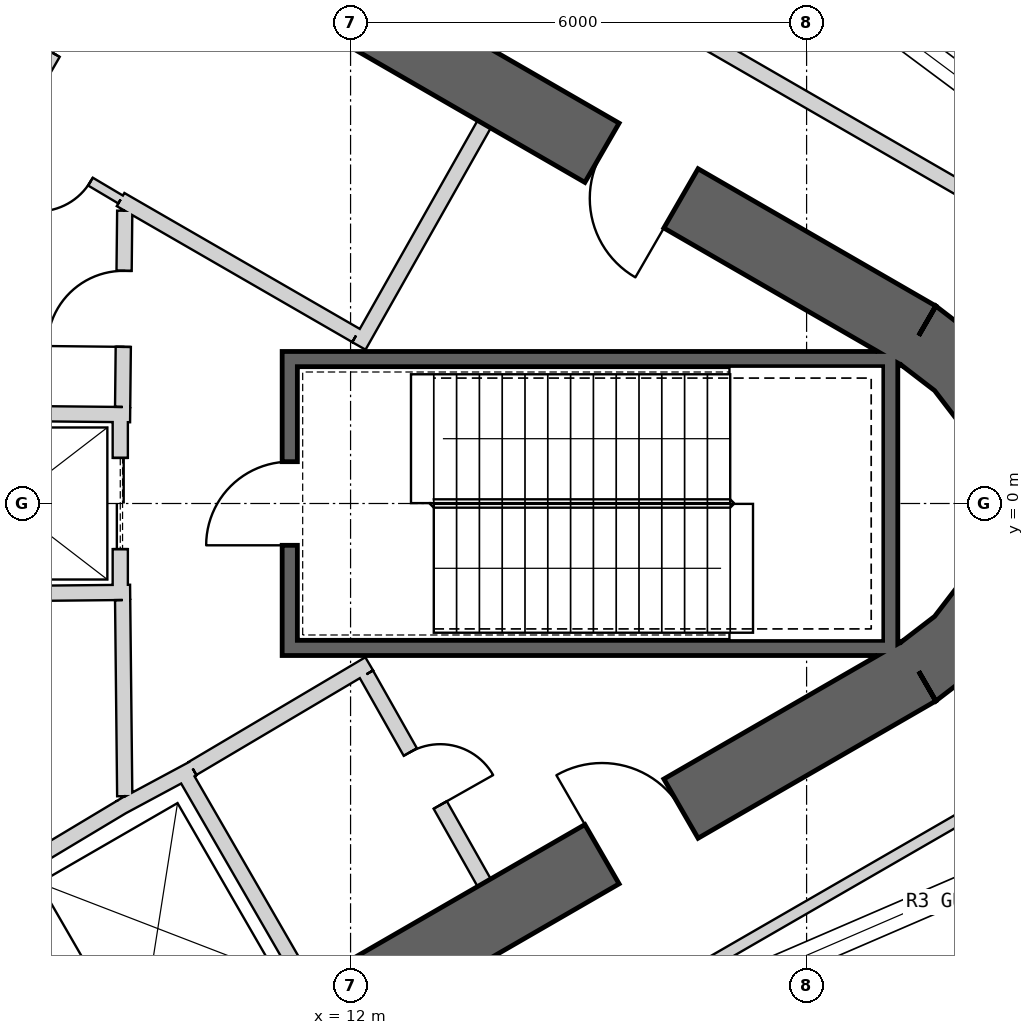
"""IFC4 building model, lengths in metres.
Left out: names, types, materials, properties, quantities, classifications, styles, units other than length and angle.
Written with IfcOpenShell. Run it as: python <this file> out.ifc"""

import sys

from ifc_helpers import new_model, si_unit, direction, frame, frame_2d, origin, place, context, subcontext, project, spatial, polyline, rectangle, outline, extrude, element, fill, save


model = new_model("IFC4")
c1 = context("Model", 3, precision=1e-05, world=origin(), true_north=direction((0.0, 1.0)))
c2 = subcontext(c1, "Body", "Model", "MODEL_VIEW")
j1 = project(units=[si_unit("LENGTHUNIT", "METRE"), si_unit("PLANEANGLEUNIT", "RADIAN")], contexts=[c1])
p1 = place(None, origin())
s1 = spatial("IfcSite", under=j1, at=p1, CompositionType="ELEMENT")
p2 = place(p1, origin())
s2 = spatial("IfcBuilding", under=s1, at=p2, CompositionType="ELEMENT")
p3 = place(p2, frame((0.0, 0.0, 430.3)))
s3 = spatial("IfcBuildingStorey", under=s2, at=p3, CompositionType="ELEMENT", Elevation=430.3)
p4 = place(p3, frame((19.475, 2.208, 0.0), z_axis=(0.0, 0.0, 1.0), x_axis=(-0.866028369851, 0.499994862586, 0.0)))
e1 = element("IfcWall", 1, at=p4, inside=s3, PredefinedType="SHEAR", context=c2, shape_type="SweptSolid", body=[
    extrude(rectangle(XDim=31.523, YDim=0.9, at=frame_2d((15.762, 0.0))), origin(), (0.0, 0.0, 1.0), 5.0),
])
p5 = place(p4, frame((3.612, 0.0, 0.0)))
e2 = element("IfcOpeningElement", 2, at=p5, cuts=e1, PredefinedType="OPENING", context=c2, shape_type="SweptSolid", body=[
    extrude(rectangle(XDim=1.2, YDim=2.4, at=frame_2d((0.6, 1.2))), frame((0.0, 0.46, 0.0), z_axis=(0.0, -1.0, 0.0), x_axis=(1.0, 0.0, 0.0)), (0.0, 0.0, 1.0), 0.92),
])
p6 = place(p4, frame((26.712, 0.0, 0.0)))
e3 = element("IfcOpeningElement", 3, at=p6, cuts=e1, PredefinedType="OPENING", context=c2, shape_type="SweptSolid", body=[
    extrude(rectangle(XDim=1.2, YDim=2.4, at=frame_2d((0.6, 1.2))), frame((0.0, 0.46, 0.0), z_axis=(0.0, -1.0, 0.0), x_axis=(1.0, 0.0, 0.0)), (0.0, 0.0, 1.0), 0.92),
])
p7 = place(p3, frame((-7.825, -17.97, 0.0), z_axis=(0.0, 0.0, 1.0), x_axis=(0.866028369851, 0.499994862586, 0.0)))
e4 = element("IfcWall", 4, at=p7, inside=s3, PredefinedType="SHEAR", context=c2, shape_type="SweptSolid", body=[
    extrude(rectangle(XDim=31.523, YDim=0.9, at=frame_2d((15.762, 0.0))), origin(), (0.0, 0.0, 1.0), 5.0),
])
p8 = place(p7, frame((17.862, 0.0, 0.0)))
e5 = element("IfcOpeningElement", 5, at=p8, cuts=e4, PredefinedType="OPENING", context=c2, shape_type="SweptSolid", body=[
    extrude(rectangle(XDim=1.2, YDim=2.4, at=frame_2d((0.6, 1.2))), frame((0.0, 0.46, 0.0), z_axis=(0.0, -1.0, 0.0), x_axis=(1.0, 0.0, 0.0)), (0.0, 0.0, 1.0), 0.92),
])
p9 = place(p7, frame((20.562, 0.0, 0.0)))
e6 = element("IfcOpeningElement", 6, at=p9, cuts=e4, PredefinedType="OPENING", context=c2, shape_type="SweptSolid", body=[
    extrude(rectangle(XDim=1.2, YDim=2.4, at=frame_2d((0.6, 1.2))), frame((0.0, 0.46, 0.0), z_axis=(0.0, -1.0, 0.0), x_axis=(1.0, 0.0, 0.0)), (0.0, 0.0, 1.0), 0.92),
])
p10 = place(p7, frame((26.712, 0.0, 0.0)))
e7 = element("IfcOpeningElement", 7, at=p10, cuts=e4, PredefinedType="OPENING", context=c2, shape_type="SweptSolid", body=[
    extrude(rectangle(XDim=1.2, YDim=2.4, at=frame_2d((0.6, 1.2))), frame((0.0, 0.46, 0.0), z_axis=(0.0, -1.0, 0.0), x_axis=(1.0, 0.0, 0.0)), (0.0, 0.0, 1.0), 0.92),
])
p11 = place(p7, frame((3.612, 0.0, 0.0)))
e8 = element("IfcOpeningElement", 8, at=p11, cuts=e4, PredefinedType="OPENING", context=c2, shape_type="SweptSolid", body=[
    extrude(rectangle(XDim=1.2, YDim=2.4, at=frame_2d((0.6, 1.2))), frame((0.0, 0.46, 0.0), z_axis=(0.0, -1.0, 0.0), x_axis=(1.0, 0.0, 0.0)), (0.0, 0.0, 1.0), 0.92),
])
p12 = place(p3, origin())
e9 = element("IfcWall", 9, at=p12, inside=s3, PredefinedType="SHEAR", context=c2, shape_type="SweptSolid", body=[
    extrude(outline(polyline([(19.7, -2.598), (20.321, -2.121), (20.798, -1.5), (21.098, -0.777), (21.2, 0.0), (21.098, 0.777), (20.798, 1.5), (20.321, 2.121), (19.7, 2.598), (19.25, 1.819), (19.685, 1.485), (20.019, 1.05), (20.229, 0.543), (20.3, 0.0), (20.229, -0.543), (20.019, -1.05), (19.685, -1.485), (19.25, -1.819), (19.7, -2.598)])), origin(), (0.0, 0.0, 1.0), 5.0),
])
p13 = place(p3, frame((9.795, -3.525, 0.0), z_axis=(0.0, 0.0, 1.0), x_axis=(0.499984717929, -0.866034226713, 0.0)))
e10 = element("IfcWall", 10, at=p13, inside=s3, PredefinedType="PLUMBINGWALL", context=c2, shape_type="SweptSolid", body=[
    extrude(rectangle(XDim=3.25, YDim=0.2, at=frame_2d((1.625, 0.0))), origin(), (0.0, 0.0, 1.0), 4.75),
])
p14 = place(p3, frame((8.974, -3.999, 0.0), z_axis=(0.0, 0.0, 1.0), x_axis=(0.880907015104, 0.473289373154, 0.0)))
e11 = element("IfcWall", 11, at=p14, inside=s3, PredefinedType="PLUMBINGWALL", context=c2, shape_type="SweptSolid", body=[
    extrude(rectangle(XDim=1.078, YDim=0.2, at=frame_2d((0.539, 0.0))), origin(), (0.0, 0.0, 1.0), 4.75),
])
p15 = place(p3, frame((7.497, -4.886, 0.0), z_axis=(0.0, 0.0, 1.0), x_axis=(0.857516281273, 0.51445682749, 0.0)))
e12 = element("IfcWall", 12, at=p15, inside=s3, PredefinedType="PLUMBINGWALL", context=c2, shape_type="SweptSolid", body=[
    extrude(rectangle(XDim=1.845, YDim=0.2, at=frame_2d((0.922, 0.0))), origin(), (0.0, 0.0, 1.0), 4.75),
])
p16 = place(p3, frame((19.2, 1.9, -0.25), z_axis=(0.0, 0.0, 1.0), x_axis=(-1.0, 0.0, 0.0)))
e13 = element("IfcWall", 13, at=p16, inside=s3, PredefinedType="SHEAR", context=c2, shape_type="SweptSolid", body=[
    extrude(rectangle(XDim=8.1, YDim=0.2, at=frame_2d((4.05, 0.0))), origin(), (0.0, 0.0, 1.0), 5.0),
])
p17 = place(p3, frame((19.1, -2.0, -0.25), z_axis=(0.0, 0.0, 1.0), x_axis=(0.0, 1.0, 0.0)))
e14 = element("IfcWall", 14, at=p17, inside=s3, PredefinedType="SHEAR", context=c2, shape_type="SweptSolid", body=[
    extrude(rectangle(XDim=3.8, YDim=0.2, at=frame_2d((1.9, 0.0))), origin(), (0.0, 0.0, 1.0), 5.0),
])
p18 = place(p3, frame((11.1, -1.9, -0.25), z_axis=(0.0, 0.0, 1.0), x_axis=(1.0, 0.0, 0.0)))
e15 = element("IfcWall", 15, at=p18, inside=s3, PredefinedType="SHEAR", context=c2, shape_type="SweptSolid", body=[
    extrude(rectangle(XDim=7.9, YDim=0.2, at=frame_2d((3.95, 0.0))), origin(), (0.0, 0.0, 1.0), 5.0),
])
p19 = place(p3, frame((11.2, -1.8, -0.25), z_axis=(0.0, 0.0, 1.0), x_axis=(0.0, 1.0, 0.0)))
e16 = element("IfcWall", 16, at=p19, inside=s3, PredefinedType="SHEAR", context=c2, shape_type="SweptSolid", body=[
    extrude(rectangle(XDim=3.6, YDim=0.2, at=frame_2d((1.8, 0.0))), origin(), (0.0, 0.0, 1.0), 5.0),
])
p20 = place(p19, frame((1.25, 0.0, 0.25)))
e17 = element("IfcOpeningElement", 17, at=p20, cuts=e16, PredefinedType="OPENING", context=c2, shape_type="SweptSolid", body=[
    extrude(rectangle(XDim=1.1, YDim=2.1, at=frame_2d((0.55, 1.05))), frame((0.0, 0.11, 0.0), z_axis=(0.0, -1.0, 0.0), x_axis=(1.0, 0.0, 0.0)), (0.0, 0.0, 1.0), 0.22),
])
p21 = place(p3, frame((8.97, 1.2, 0.0), z_axis=(0.0, 0.0, 1.0), x_axis=(0.0, -1.0, 0.0)))
e18 = element("IfcWall", 18, at=p21, inside=s3, PredefinedType="PLUMBINGWALL", context=c2, shape_type="SweptSolid", body=[
    extrude(rectangle(XDim=2.4, YDim=0.2, at=frame_2d((1.2, 0.0))), origin(), (0.0, 0.0, 1.0), 4.75),
])
p22 = place(p21, frame((0.6, 0.0, 0.0)))
e19 = element("IfcOpeningElement", 19, at=p22, cuts=e18, PredefinedType="OPENING", context=c2, shape_type="SweptSolid", body=[
    extrude(rectangle(XDim=1.2, YDim=2.4, at=frame_2d((0.6, 1.2))), frame((0.0, 0.11, 0.0), z_axis=(0.0, -1.0, 0.0), x_axis=(1.0, 0.0, 0.0)), (0.0, 0.0, 1.0), 0.22),
])
p23 = place(p3, frame((9.1, -1.169, 0.0), z_axis=(0.0, 0.0, 1.0), x_axis=(-0.999950064753, -0.009993397809, 0.0)))
e20 = element("IfcWall", 20, at=p23, inside=s3, PredefinedType="PLUMBINGWALL", context=c2, shape_type="SweptSolid", body=[
    extrude(rectangle(XDim=3.2, YDim=0.2, at=frame_2d((1.6, 0.0))), origin(), (0.0, 0.0, 1.0), 4.75),
])
p24 = place(p3, frame((9.1, 1.169, 0.0), z_axis=(0.0, 0.0, 1.0), x_axis=(-0.99994990606, 0.010009264196, 0.0)))
e21 = element("IfcWall", 21, at=p24, inside=s3, PredefinedType="PLUMBINGWALL", context=c2, shape_type="SweptSolid", body=[
    extrude(rectangle(XDim=3.0, YDim=0.2, at=frame_2d((1.5, 0.0))), origin(), (0.0, 0.0, 1.0), 4.75),
])
p25 = place(p3, frame((7.508, 4.845, 0.0), z_axis=(0.0, 0.0, 1.0), x_axis=(0.500017246033, 0.866015446554, 0.0)))
e22 = element("IfcWall", 22, at=p25, inside=s3, PredefinedType="PARTITIONING", context=c2, shape_type="SweptSolid", body=[
    extrude(rectangle(XDim=3.25, YDim=0.12, at=frame_2d((1.625, 0.0))), origin(), (0.0, 0.0, 1.0), 4.75),
])
p26 = place(p25, frame((1.225, 0.0, 0.0)))
e23 = element("IfcOpeningElement", 23, at=p26, cuts=e22, PredefinedType="OPENING", context=c2, shape_type="SweptSolid", body=[
    extrude(rectangle(XDim=0.8, YDim=2.1, at=frame_2d((0.4, 1.05))), frame((0.0, 0.07, 0.0), z_axis=(0.0, -1.0, 0.0), x_axis=(1.0, 0.0, 0.0)), (0.0, 0.0, 1.0), 0.14),
])
p27 = place(p3, frame((12.11, 2.073, 0.0), z_axis=(0.0, 0.0, 1.0), x_axis=(0.49196600604, 0.870614408852, 0.0)))
e24 = element("IfcWall", 24, at=p27, inside=s3, PredefinedType="PARTITIONING", context=c2, shape_type="SweptSolid", body=[
    extrude(rectangle(XDim=3.35, YDim=0.2, at=frame_2d((1.675, 0.0))), origin(), (0.0, 0.0, 1.0), 4.75),
])
p28 = place(p3, frame((8.974, 3.999, 0.0), z_axis=(0.0, 0.0, 1.0), x_axis=(0.86601284211, -0.500021756827, 0.0)))
e25 = element("IfcWall", 25, at=p28, inside=s3, PredefinedType="PARTITIONING", context=c2, shape_type="SweptSolid", body=[
    extrude(rectangle(XDim=3.577, YDim=0.2, at=frame_2d((1.789, 0.0))), origin(), (0.0, 0.0, 1.0), 4.75),
])
p29 = place(p3, frame((7.493, 4.878, 0.0), z_axis=(0.0, 0.0, 1.0), x_axis=(0.859934455514, -0.510404479035, 0.0)))
e26 = element("IfcWall", 26, at=p29, inside=s3, PredefinedType="PARTITIONING", context=c2, shape_type="SweptSolid", body=[
    extrude(rectangle(XDim=1.722, YDim=0.12, at=frame_2d((0.861, 0.0))), origin(), (0.0, 0.0, 1.0), 4.75),
])
p30 = place(p29, frame((0.461, 0.0, 0.0)))
e27 = element("IfcOpeningElement", 27, at=p30, cuts=e26, PredefinedType="OPENING", context=c2, shape_type="SweptSolid", body=[
    extrude(rectangle(XDim=0.8, YDim=2.1, at=frame_2d((0.4, 1.05))), frame((0.0, 0.07, 0.0), z_axis=(0.0, -1.0, 0.0), x_axis=(1.0, 0.0, 0.0)), (0.0, 0.0, 1.0), 0.14),
])
p31 = place(p3, frame((12.245, -2.109, 0.0), z_axis=(0.0, 0.0, 1.0), x_axis=(-0.860414880418, -0.509594185166, 0.0)))
e28 = element("IfcWall", 28, at=p31, inside=s3, PredefinedType="PARTITIONING", context=c2, shape_type="SweptSolid", body=[
    extrude(rectangle(XDim=2.7, YDim=0.2, at=frame_2d((1.35, 0.0))), origin(), (0.0, 0.0, 1.0), 4.75),
])
p32 = place(p3, frame((13.758, -4.99, 0.0), z_axis=(0.0, 0.0, 1.0), x_axis=(-0.491993409184, 0.87059892334, 0.0)))
e29 = element("IfcWall", 29, at=p32, inside=s3, PredefinedType="PARTITIONING", context=c2, shape_type="SweptSolid", body=[
    extrude(rectangle(XDim=3.15, YDim=0.2, at=frame_2d((1.575, 0.0))), origin(), (0.0, 0.0, 1.0), 4.75),
])
p33 = place(p32, frame((1.175, 0.0, 0.0)))
e30 = element("IfcOpeningElement", 30, at=p33, cuts=e29, PredefinedType="OPENING", context=c2, shape_type="SweptSolid", body=[
    extrude(rectangle(XDim=0.8, YDim=2.1, at=frame_2d((0.4, 1.05))), frame((0.0, 0.11, 0.0), z_axis=(0.0, -1.0, 0.0), x_axis=(1.0, 0.0, 0.0)), (0.0, 0.0, 1.0), 0.22),
])
p34 = place(p3, frame((9.029, -3.851, 0.0), z_axis=(0.0, 0.0, 1.0), x_axis=(-0.010784614026, 0.999941844359, 0.0)))
e31 = element("IfcWall", 31, at=p34, inside=s3, PredefinedType="PARTITIONING", context=c2, shape_type="SweptSolid", body=[
    extrude(rectangle(XDim=2.581, YDim=0.2, at=frame_2d((1.291, 0.0))), origin(), (0.0, 0.0, 1.0), 4.75),
])
p35 = place(p3, frame((9.001, 1.27, 0.0), z_axis=(0.0, 0.0, 1.0), x_axis=(0.010780534828, 0.999941888346, 0.0)))
e32 = element("IfcWall", 32, at=p35, inside=s3, PredefinedType="PARTITIONING", context=c2, shape_type="SweptSolid", body=[
    extrude(rectangle(XDim=2.582, YDim=0.2, at=frame_2d((1.291, 0.0))), origin(), (0.0, 0.0, 1.0), 4.75),
])
p36 = place(p35, frame((0.791, 0.0, 0.0)))
e33 = element("IfcOpeningElement", 33, at=p36, cuts=e32, PredefinedType="OPENING", context=c2, shape_type="SweptSolid", body=[
    extrude(rectangle(XDim=1.0, YDim=2.1, at=frame_2d((0.5, 1.05))), frame((0.0, 0.11, 0.0), z_axis=(0.0, -1.0, 0.0), x_axis=(1.0, 0.0, 0.0)), (0.0, 0.0, 1.0), 0.22),
])
p37 = place(p3, frame((20.834, 3.675, 0.0), z_axis=(0.0, 0.0, 1.0), x_axis=(-0.866028536494, 0.499994573949, 0.0)))
e34 = element("IfcWall", 34, at=p37, inside=s3, PredefinedType="PARTITIONING", context=c2, shape_type="SweptSolid", body=[
    extrude(rectangle(XDim=32.411, YDim=0.2, at=frame_2d((16.206, 0.0))), origin(), (0.0, 0.0, 1.0), 4.75),
])
p38 = place(p37, frame((7.7, 0.0, 0.0)))
e35 = element("IfcOpeningElement", 35, at=p38, cuts=e34, PredefinedType="OPENING", context=c2, shape_type="SweptSolid", body=[
    extrude(rectangle(XDim=1.0, YDim=2.1, at=frame_2d((0.5, 1.05))), frame((0.0, 0.11, 0.0), z_axis=(0.0, -1.0, 0.0), x_axis=(1.0, 0.0, 0.0)), (0.0, 0.0, 1.0), 0.22),
])
p39 = place(p37, frame((18.006, 0.0, 0.0)))
e36 = element("IfcOpeningElement", 36, at=p39, cuts=e34, PredefinedType="OPENING", context=c2, shape_type="SweptSolid", body=[
    extrude(rectangle(XDim=1.0, YDim=2.1, at=frame_2d((0.5, 1.05))), frame((0.0, 0.11, 0.0), z_axis=(0.0, -1.0, 0.0), x_axis=(1.0, 0.0, 0.0)), (0.0, 0.0, 1.0), 0.22),
])
p40 = place(p3, frame((6.698, -11.837, 0.0), z_axis=(0.0, 0.0, 1.0), x_axis=(0.866022938386, 0.500004270171, 0.0)))
e37 = element("IfcWall", 37, at=p40, inside=s3, PredefinedType="PLUMBINGWALL", context=c2, shape_type="SweptSolid", body=[
    extrude(rectangle(XDim=16.148, YDim=0.15, at=frame_2d((8.074, 0.0))), origin(), (0.0, 0.0, 1.0), 4.75),
])
p41 = place(p40, frame((2.243, 0.0, 0.0)))
e38 = element("IfcOpeningElement", 38, at=p41, cuts=e37, PredefinedType="OPENING", context=c2, shape_type="SweptSolid", body=[
    extrude(rectangle(XDim=0.8, YDim=2.1, at=frame_2d((0.4, 1.05))), frame((0.0, 0.085, 0.0), z_axis=(0.0, -1.0, 0.0), x_axis=(1.0, 0.0, 0.0)), (0.0, 0.0, 1.0), 0.17),
])
p42 = place(p20, origin())
e39 = element("IfcDoor", 39, at=p42, inside=s3, OperationType="SINGLE_SWING_LEFT", PredefinedType="USERDEFINED", context=c2, shape_type="SweptSolid", body=[
    extrude(rectangle(XDim=1.1, YDim=2.1, at=frame_2d((0.55, 1.05))), frame((0.0, 0.025, 0.0), z_axis=(0.0, -1.0, 0.0), x_axis=(1.0, 0.0, 0.0)), (0.0, 0.0, 1.0), 0.05),
])
fill(e17, e39)
p43 = place(p36, origin())
e40 = element("IfcDoor", 40, at=p43, inside=s3, OperationType="SINGLE_SWING_LEFT", PredefinedType="USERDEFINED", context=c2, shape_type="SweptSolid", body=[
    extrude(rectangle(XDim=1.0, YDim=2.1, at=frame_2d((0.5, 1.05))), frame((0.0, 0.025, 0.0), z_axis=(0.0, -1.0, 0.0), x_axis=(1.0, 0.0, 0.0)), (0.0, 0.0, 1.0), 0.05),
])
fill(e33, e40)
p44 = place(p22, origin())
e41 = element("IfcDoor", 41, at=p44, inside=s3, OperationType="SLIDING_TO_LEFT", PredefinedType="USERDEFINED", context=c2, shape_type="SweptSolid", body=[
    extrude(rectangle(XDim=1.2, YDim=2.4, at=frame_2d((0.6, 1.2))), frame((0.0, 0.025, 0.0), z_axis=(0.0, -1.0, 0.0), x_axis=(1.0, 0.0, 0.0)), (0.0, 0.0, 1.0), 0.05),
])
fill(e19, e41)
p45 = place(p30, origin())
e42 = element("IfcDoor", 42, at=p45, inside=s3, OperationType="SINGLE_SWING_LEFT", PredefinedType="USERDEFINED", context=c2, shape_type="SweptSolid", body=[
    extrude(rectangle(XDim=0.8, YDim=2.1, at=frame_2d((0.4, 1.05))), frame((0.0, 0.025, 0.0), z_axis=(0.0, -1.0, 0.0), x_axis=(1.0, 0.0, 0.0)), (0.0, 0.0, 1.0), 0.05),
])
fill(e27, e42)
p46 = place(p26, origin())
e43 = element("IfcDoor", 43, at=p46, inside=s3, OperationType="SINGLE_SWING_LEFT", PredefinedType="USERDEFINED", context=c2, shape_type="SweptSolid", body=[
    extrude(rectangle(XDim=0.8, YDim=2.1, at=frame_2d((0.4, 1.05))), frame((0.0, 0.025, 0.0), z_axis=(0.0, -1.0, 0.0), x_axis=(1.0, 0.0, 0.0)), (0.0, 0.0, 1.0), 0.05),
])
fill(e23, e43)
p47 = place(p33, origin())
e44 = element("IfcDoor", 44, at=p47, inside=s3, OperationType="SINGLE_SWING_LEFT", PredefinedType="USERDEFINED", context=c2, shape_type="SweptSolid", body=[
    extrude(rectangle(XDim=0.8, YDim=2.1, at=frame_2d((0.4, 1.05))), frame((0.0, 0.025, 0.0), z_axis=(0.0, -1.0, 0.0), x_axis=(1.0, 0.0, 0.0)), (0.0, 0.0, 1.0), 0.05),
])
fill(e30, e44)
p48 = place(p10, origin())
e45 = element("IfcDoor", 45, at=p48, inside=s3, OperationType="SINGLE_SWING_LEFT", PredefinedType="USERDEFINED", context=c2, shape_type="SweptSolid", body=[
    extrude(rectangle(XDim=1.2, YDim=2.4, at=frame_2d((0.6, 1.2))), frame((0.0, 0.025, 0.0), z_axis=(0.0, -1.0, 0.0), x_axis=(1.0, 0.0, 0.0)), (0.0, 0.0, 1.0), 0.05),
])
fill(e7, e45)
p49 = place(p5, origin())
e46 = element("IfcDoor", 46, at=p49, inside=s3, OperationType="SINGLE_SWING_LEFT", PredefinedType="USERDEFINED", context=c2, shape_type="SweptSolid", body=[
    extrude(rectangle(XDim=1.2, YDim=2.4, at=frame_2d((0.6, 1.2))), frame((0.0, 0.025, 0.0), z_axis=(0.0, -1.0, 0.0), x_axis=(1.0, 0.0, 0.0)), (0.0, 0.0, 1.0), 0.05),
])
fill(e2, e46)
save(model, sys.argv[1])
